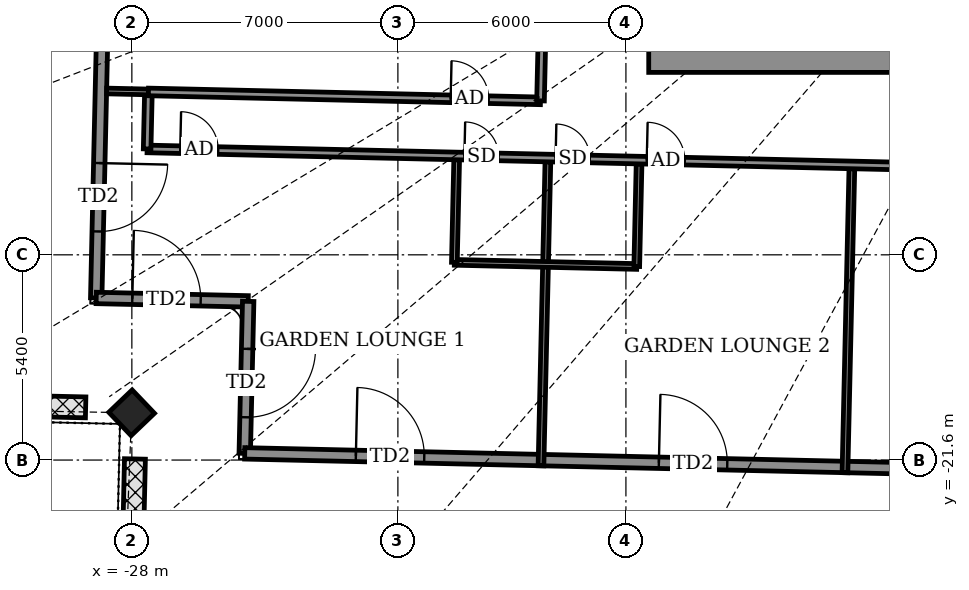
"""IFC4 building model, lengths in metres.
Left out: names, types, materials, properties, quantities, classifications, styles, units other than length and angle.
Written with IfcOpenShell. Run it as: python <this file> out.ifc"""

import sys

from ifc_helpers import new_model, si_unit, direction, frame, frame_2d, origin, origin_2d, place, context, subcontext, project, spatial, rectangle, extrude, element, fill, save


model = new_model("IFC4")
c1 = context("Model", 3, precision=1e-05, world=origin(), true_north=direction((0.0, 1.0)))
c2 = subcontext(c1, "Body", "Model", "MODEL_VIEW")
j1 = project(units=[si_unit("LENGTHUNIT", "METRE"), si_unit("PLANEANGLEUNIT", "RADIAN")], contexts=[c1])
p1 = place(None, origin())
s1 = spatial("IfcSite", under=j1, at=p1, CompositionType="ELEMENT")
p2 = place(p1, origin())
s2 = spatial("IfcBuilding", under=s1, at=p2, CompositionType="ELEMENT")
p3 = place(p2, frame((0.0, 0.0, 329.7)))
s3 = spatial("IfcBuildingStorey", under=s2, at=p3, CompositionType="ELEMENT", Elevation=329.7)
p4 = place(p3, frame((-28.006, -20.356, -0.55), z_axis=(0.0, 0.0, 1.0), x_axis=(0.690863130287, -0.722985570541, 0.0)))
e1 = element("IfcColumn", 1, at=p4, inside=s3, PredefinedType="COLUMN", context=c2, shape_type="SweptSolid", body=[
    extrude(rectangle(XDim=0.85, YDim=0.85, at=origin_2d()), origin(), (0.0, 0.0, 1.0), 4.6),
])
p5 = place(p3, frame((-28.648, -4.559, 0.0), z_axis=(0.0, 0.0, 1.0), x_axis=(-0.022696235044, -0.99974240728, 0.0)))
e2 = element("IfcWall", 2, at=p5, inside=s3, PredefinedType="SOLIDWALL", context=c2, shape_type="SweptSolid", body=[
    extrude(rectangle(XDim=12.779, YDim=0.3, at=frame_2d((6.39, 0.0))), origin(), (0.0, 0.0, 1.0), 2.1),
])
p6 = place(p5, frame((2.792, 0.0, 0.0)))
e3 = element("IfcOpeningElement", 3, at=p6, cuts=e2, PredefinedType="OPENING", context=c2, shape_type="SweptSolid", body=[
    extrude(rectangle(XDim=1.8, YDim=2.0, at=frame_2d((0.9, 1.0))), frame((0.0, 0.16, 0.0), z_axis=(0.0, -1.0, 0.0), x_axis=(1.0, 0.0, 0.0)), (0.0, 0.0, 1.0), 0.32),
])
p7 = place(p5, frame((9.229, 0.0, 0.0)))
e4 = element("IfcOpeningElement", 4, at=p7, cuts=e2, PredefinedType="OPENING", context=c2, shape_type="SweptSolid", body=[
    extrude(rectangle(XDim=1.8, YDim=2.0, at=frame_2d((0.9, 1.0))), frame((0.0, 0.16, 0.0), z_axis=(0.0, -1.0, 0.0), x_axis=(1.0, 0.0, 0.0)), (0.0, 0.0, 1.0), 0.32),
])
p8 = place(p3, frame((-28.938, -17.335, 0.0), z_axis=(0.0, 0.0, 1.0), x_axis=(0.999746353029, -0.022521758502, 0.0)))
e5 = element("IfcWall", 5, at=p8, inside=s3, PredefinedType="SOLIDWALL", context=c2, shape_type="SweptSolid", body=[
    extrude(rectangle(XDim=4.0, YDim=0.3, at=frame_2d((2.0, 0.0))), origin(), (0.0, 0.0, 1.0), 2.1),
])
p9 = place(p8, frame((0.95, 0.0, 0.0)))
e6 = element("IfcOpeningElement", 6, at=p9, cuts=e5, PredefinedType="OPENING", context=c2, shape_type="SweptSolid", body=[
    extrude(rectangle(XDim=1.8, YDim=2.0, at=frame_2d((0.9, 1.0))), frame((0.0, 0.16, 0.0), z_axis=(0.0, -1.0, 0.0), x_axis=(1.0, 0.0, 0.0)), (0.0, 0.0, 1.0), 0.32),
])
p10 = place(p3, frame((-24.939, -17.425, 0.0), z_axis=(0.0, 0.0, 1.0), x_axis=(-0.022765770952, -0.999740826251, 0.0)))
e7 = element("IfcWall", 7, at=p10, inside=s3, PredefinedType="SOLIDWALL", context=c2, shape_type="SweptSolid", body=[
    extrude(rectangle(XDim=4.0, YDim=0.3, at=frame_2d((2.0, 0.0))), origin(), (0.0, 0.0, 1.0), 2.15),
])
p11 = place(p10, frame((1.25, 0.0, 0.0)))
e8 = element("IfcOpeningElement", 8, at=p11, cuts=e7, PredefinedType="OPENING", context=c2, shape_type="SweptSolid", body=[
    extrude(rectangle(XDim=1.8, YDim=2.0, at=frame_2d((0.9, 1.0))), frame((0.0, 0.16, 0.0), z_axis=(0.0, -1.0, 0.0), x_axis=(1.0, 0.0, 0.0)), (0.0, 0.0, 1.0), 0.32),
])
p12 = place(p3, frame((-25.03, -21.424, 0.0), z_axis=(0.0, 0.0, 1.0), x_axis=(0.9997425899, -0.022688189451, 0.0)))
e9 = element("IfcWall", 9, at=p12, inside=s3, PredefinedType="SOLIDWALL", context=c2, shape_type="SweptSolid", body=[
    extrude(rectangle(XDim=47.25, YDim=0.3, at=frame_2d((23.625, 0.0))), origin(), (0.0, 0.0, 1.0), 2.15),
])
p13 = place(p12, frame((2.925, 0.0, 0.0)))
e10 = element("IfcOpeningElement", 10, at=p13, cuts=e9, PredefinedType="OPENING", context=c2, shape_type="SweptSolid", body=[
    extrude(rectangle(XDim=1.8, YDim=2.0, at=frame_2d((0.9, 1.0))), frame((0.0, 0.16, 0.0), z_axis=(0.0, -1.0, 0.0), x_axis=(1.0, 0.0, 0.0)), (0.0, 0.0, 1.0), 0.32),
])
p14 = place(p12, frame((10.9, 0.0, 0.0)))
e11 = element("IfcOpeningElement", 11, at=p14, cuts=e9, PredefinedType="OPENING", context=c2, shape_type="SweptSolid", body=[
    extrude(rectangle(XDim=1.8, YDim=2.0, at=frame_2d((0.9, 1.0))), frame((0.0, 0.16, 0.0), z_axis=(0.0, -1.0, 0.0), x_axis=(1.0, 0.0, 0.0)), (0.0, 0.0, 1.0), 0.32),
])
p15 = place(p12, frame((18.475, 0.0, 0.0)))
e12 = element("IfcOpeningElement", 12, at=p15, cuts=e9, PredefinedType="OPENING", context=c2, shape_type="SweptSolid", body=[
    extrude(rectangle(XDim=1.8, YDim=2.0, at=frame_2d((0.9, 1.0))), frame((0.0, 0.16, 0.0), z_axis=(0.0, -1.0, 0.0), x_axis=(1.0, 0.0, 0.0)), (0.0, 0.0, 1.0), 0.32),
])
p16 = place(p12, frame((25.625, 0.0, 0.0)))
e13 = element("IfcOpeningElement", 13, at=p16, cuts=e9, PredefinedType="OPENING", context=c2, shape_type="SweptSolid", body=[
    extrude(rectangle(XDim=1.8, YDim=2.0, at=frame_2d((0.9, 1.0))), frame((0.0, 0.16, 0.0), z_axis=(0.0, -1.0, 0.0), x_axis=(1.0, 0.0, 0.0)), (0.0, 0.0, 1.0), 0.32),
])
p17 = place(p12, frame((31.525, 0.0, 0.0)))
e14 = element("IfcOpeningElement", 14, at=p17, cuts=e9, PredefinedType="OPENING", context=c2, shape_type="SweptSolid", body=[
    extrude(rectangle(XDim=1.8, YDim=2.0, at=frame_2d((0.9, 1.0))), frame((0.0, 0.16, 0.0), z_axis=(0.0, -1.0, 0.0), x_axis=(1.0, 0.0, 0.0)), (0.0, 0.0, 1.0), 0.32),
])
p18 = place(p12, frame((36.2, 0.0, 0.0)))
e15 = element("IfcOpeningElement", 15, at=p18, cuts=e9, PredefinedType="OPENING", context=c2, shape_type="SweptSolid", body=[
    extrude(rectangle(XDim=1.8, YDim=2.0, at=frame_2d((0.9, 1.0))), frame((0.0, 0.16, 0.0), z_axis=(0.0, -1.0, 0.0), x_axis=(1.0, 0.0, 0.0)), (0.0, 0.0, 1.0), 0.32),
])
p19 = place(p12, frame((42.525, 0.0, 0.0)))
e16 = element("IfcOpeningElement", 16, at=p19, cuts=e9, PredefinedType="OPENING", context=c2, shape_type="SweptSolid", body=[
    extrude(rectangle(XDim=1.8, YDim=2.0, at=frame_2d((0.9, 1.0))), frame((0.0, 0.16, 0.0), z_axis=(0.0, -1.0, 0.0), x_axis=(1.0, 0.0, 0.0)), (0.0, 0.0, 1.0), 0.32),
])
p20 = place(p3, frame((-27.967, -23.708, 0.0), z_axis=(0.0, 0.0, 1.0), x_axis=(0.022500871039, 0.999746823352, 0.0)))
e17 = element("IfcWall", 17, at=p20, inside=s3, PredefinedType="USERDEFINED", context=c2, shape_type="SweptSolid", body=[
    extrude(rectangle(XDim=2.137, YDim=0.55, at=frame_2d((1.069, 0.0))), origin(), (0.0, 0.0, 1.0), 0.8),
])
p21 = place(p3, frame((-29.216, -20.214, 0.0), z_axis=(0.0, 0.0, 1.0), x_axis=(-0.999746591885, 0.022511153115, 0.0)))
e18 = element("IfcWall", 18, at=p21, inside=s3, PredefinedType="USERDEFINED", context=c2, shape_type="SweptSolid", body=[
    extrude(rectangle(XDim=2.136, YDim=0.55, at=frame_2d((1.068, 0.0))), origin(), (0.0, 0.0, 1.0), 0.8),
])
p22 = place(p3, frame((-17.235, -21.751, 0.0), z_axis=(0.0, 0.0, 1.0), x_axis=(0.022765770952, 0.999740826251, 0.0)))
e19 = element("IfcWall", 19, at=p22, inside=s3, PredefinedType="PARTITIONING", context=c2, shape_type="SweptSolid", body=[
    extrude(rectangle(XDim=8.0, YDim=0.15, at=frame_2d((4.0, 0.0))), origin(), (0.0, 0.0, 1.0), 2.15),
])
p23 = place(p3, frame((-9.237, -21.933, 0.0), z_axis=(0.0, 0.0, 1.0), x_axis=(0.022765770952, 0.999740826251, 0.0)))
e20 = element("IfcWall", 20, at=p23, inside=s3, PredefinedType="PARTITIONING", context=c2, shape_type="SweptSolid", body=[
    extrude(rectangle(XDim=8.0, YDim=0.15, at=frame_2d((4.0, 0.0))), origin(), (0.0, 0.0, 1.0), 2.45),
])
p24 = place(p3, frame((-19.514, -16.398, 0.0), z_axis=(0.0, 0.0, 1.0), x_axis=(0.999741520352, -0.022735269617, 0.0)))
e21 = element("IfcWall", 21, at=p24, inside=s3, PredefinedType="PARTITIONING", context=c2, shape_type="SweptSolid", body=[
    extrude(rectangle(XDim=4.8, YDim=0.15, at=frame_2d((2.4, 0.0))), origin(), (0.0, 0.0, 1.0), 2.15),
])
p25 = place(p3, frame((-19.514, -16.398, 0.0), z_axis=(0.0, 0.0, 1.0), x_axis=(0.02260842146, 0.999744396973, 0.0)))
e22 = element("IfcWall", 22, at=p25, inside=s3, PredefinedType="PARTITIONING", context=c2, shape_type="SweptSolid", body=[
    extrude(rectangle(XDim=2.7, YDim=0.15, at=frame_2d((1.35, 0.0))), origin(), (0.0, 0.0, 1.0), 2.15),
])
p26 = place(p3, frame((-14.715, -16.507, 0.0), z_axis=(0.0, 0.0, 1.0), x_axis=(0.02260842146, 0.999744396973, 0.0)))
e23 = element("IfcWall", 23, at=p26, inside=s3, PredefinedType="PARTITIONING", context=c2, shape_type="SweptSolid", body=[
    extrude(rectangle(XDim=2.7, YDim=0.15, at=frame_2d((1.35, 0.0))), origin(), (0.0, 0.0, 1.0), 2.25),
])
p27 = place(p3, frame((-27.598, -13.414, 0.0), z_axis=(0.0, 0.0, 1.0), x_axis=(0.999742489831, -0.022692598482, 0.0)))
e24 = element("IfcWall", 24, at=p27, inside=s3, PredefinedType="PARTITIONING", context=c2, shape_type="SweptSolid", body=[
    extrude(rectangle(XDim=52.75, YDim=0.2, at=frame_2d((26.375, 0.0))), origin(), (0.0, 0.0, 1.0), 2.1),
])
p28 = place(p27, frame((0.871, 0.0, 0.0)))
e25 = element("IfcOpeningElement", 25, at=p28, cuts=e24, PredefinedType="OPENING", context=c2, shape_type="SweptSolid", body=[
    extrude(rectangle(XDim=1.0, YDim=2.1, at=frame_2d((0.5, 1.05))), frame((0.0, 0.11, 0.0), z_axis=(0.0, -1.0, 0.0), x_axis=(1.0, 0.0, 0.0)), (0.0, 0.0, 1.0), 0.22),
])
p29 = place(p27, frame((8.35, 0.0, 0.0)))
e26 = element("IfcOpeningElement", 26, at=p29, cuts=e24, PredefinedType="OPENING", context=c2, shape_type="SweptSolid", body=[
    extrude(rectangle(XDim=0.9, YDim=2.1, at=frame_2d((0.45, 1.05))), frame((0.0, 0.11, 0.0), z_axis=(0.0, -1.0, 0.0), x_axis=(1.0, 0.0, 0.0)), (0.0, 0.0, 1.0), 0.22),
])
p30 = place(p27, frame((13.15, 0.0, 0.0)))
e27 = element("IfcOpeningElement", 27, at=p30, cuts=e24, PredefinedType="OPENING", context=c2, shape_type="SweptSolid", body=[
    extrude(rectangle(XDim=1.0, YDim=2.1, at=frame_2d((0.5, 1.05))), frame((0.0, 0.11, 0.0), z_axis=(0.0, -1.0, 0.0), x_axis=(1.0, 0.0, 0.0)), (0.0, 0.0, 1.0), 0.22),
])
p31 = place(p27, frame((10.75, 0.0, 0.0)))
e28 = element("IfcOpeningElement", 28, at=p31, cuts=e24, PredefinedType="OPENING", context=c2, shape_type="SweptSolid", body=[
    extrude(rectangle(XDim=0.9, YDim=2.1, at=frame_2d((0.45, 1.05))), frame((0.0, 0.11, 0.0), z_axis=(0.0, -1.0, 0.0), x_axis=(1.0, 0.0, 0.0)), (0.0, 0.0, 1.0), 0.22),
])
p32 = place(p27, frame((19.625, 0.0, 0.0)))
e29 = element("IfcOpeningElement", 29, at=p32, cuts=e24, PredefinedType="OPENING", context=c2, shape_type="SweptSolid", body=[
    extrude(rectangle(XDim=1.0, YDim=2.1, at=frame_2d((0.5, 1.05))), frame((0.0, 0.11, 0.0), z_axis=(0.0, -1.0, 0.0), x_axis=(1.0, 0.0, 0.0)), (0.0, 0.0, 1.0), 0.22),
])
p33 = place(p27, frame((26.874, 0.0, 0.0)))
e30 = element("IfcOpeningElement", 30, at=p33, cuts=e24, PredefinedType="OPENING", context=c2, shape_type="SweptSolid", body=[
    extrude(rectangle(XDim=1.0, YDim=2.1, at=frame_2d((0.5, 1.05))), frame((0.0, 0.11, 0.0), z_axis=(0.0, -1.0, 0.0), x_axis=(1.0, 0.0, 0.0)), (0.0, 0.0, 1.0), 0.22),
])
p34 = place(p27, frame((33.05, 0.0, 0.0)))
e31 = element("IfcOpeningElement", 31, at=p34, cuts=e24, PredefinedType="OPENING", context=c2, shape_type="SweptSolid", body=[
    extrude(rectangle(XDim=1.0, YDim=2.1, at=frame_2d((0.5, 1.05))), frame((0.0, 0.11, 0.0), z_axis=(0.0, -1.0, 0.0), x_axis=(1.0, 0.0, 0.0)), (0.0, 0.0, 1.0), 0.22),
])
p35 = place(p27, frame((35.3, 0.0, 0.0)))
e32 = element("IfcOpeningElement", 32, at=p35, cuts=e24, PredefinedType="OPENING", context=c2, shape_type="SweptSolid", body=[
    extrude(rectangle(XDim=0.9, YDim=2.1, at=frame_2d((0.45, 1.05))), frame((0.0, 0.11, 0.0), z_axis=(0.0, -1.0, 0.0), x_axis=(1.0, 0.0, 0.0)), (0.0, 0.0, 1.0), 0.22),
])
p36 = place(p27, frame((40.1, 0.0, 0.0)))
e33 = element("IfcOpeningElement", 33, at=p36, cuts=e24, PredefinedType="OPENING", context=c2, shape_type="SweptSolid", body=[
    extrude(rectangle(XDim=1.0, YDim=2.1, at=frame_2d((0.5, 1.05))), frame((0.0, 0.11, 0.0), z_axis=(0.0, -1.0, 0.0), x_axis=(1.0, 0.0, 0.0)), (0.0, 0.0, 1.0), 0.22),
])
p37 = place(p27, frame((37.7, 0.0, 0.0)))
e34 = element("IfcOpeningElement", 34, at=p37, cuts=e24, PredefinedType="OPENING", context=c2, shape_type="SweptSolid", body=[
    extrude(rectangle(XDim=0.9, YDim=2.1, at=frame_2d((0.45, 1.05))), frame((0.0, 0.11, 0.0), z_axis=(0.0, -1.0, 0.0), x_axis=(1.0, 0.0, 0.0)), (0.0, 0.0, 1.0), 0.22),
])
p38 = place(p27, frame((46.964, 0.0, 0.0)))
e35 = element("IfcOpeningElement", 35, at=p38, cuts=e24, PredefinedType="OPENING", context=c2, shape_type="SweptSolid", body=[
    extrude(rectangle(XDim=1.0, YDim=2.1, at=frame_2d((0.5, 1.05))), frame((0.0, 0.11, 0.0), z_axis=(0.0, -1.0, 0.0), x_axis=(1.0, 0.0, 0.0)), (0.0, 0.0, 1.0), 0.22),
])
p39 = place(p27, frame((42.4, 0.0, 0.0)))
e36 = element("IfcOpeningElement", 36, at=p39, cuts=e24, PredefinedType="OPENING", context=c2, shape_type="SweptSolid", body=[
    extrude(rectangle(XDim=0.9, YDim=2.1, at=frame_2d((0.45, 1.05))), frame((0.0, 0.11, 0.0), z_axis=(0.0, -1.0, 0.0), x_axis=(1.0, 0.0, 0.0)), (0.0, 0.0, 1.0), 0.22),
])
p40 = place(p3, frame((-27.598, -13.414, 0.0), z_axis=(0.0, 0.0, 1.0), x_axis=(0.022617910375, 0.999744182344, 0.0)))
e37 = element("IfcWall", 37, at=p40, inside=s3, PredefinedType="PARTITIONING", context=c2, shape_type="SweptSolid", body=[
    extrude(rectangle(XDim=1.5, YDim=0.2, at=frame_2d((0.75, 0.0))), origin(), (0.0, 0.0, 1.0), 4.05),
])
p41 = place(p3, frame((-28.664, -11.889, 0.0), z_axis=(0.0, 0.0, 1.0), x_axis=(0.999738848859, -0.022852441507, 0.0)))
e38 = element("IfcWall", 38, at=p41, inside=s3, PredefinedType="PARTITIONING", context=c2, shape_type="SweptSolid", body=[
    extrude(rectangle(XDim=1.1, YDim=0.15, at=frame_2d((0.55, 0.0))), origin(), (0.0, 0.0, 1.0), 2.15),
])
p42 = place(p3, frame((-27.564, -11.914, 0.0), z_axis=(0.0, 0.0, 1.0), x_axis=(0.999740930851, -0.02276117706, 0.0)))
e39 = element("IfcWall", 39, at=p42, inside=s3, PredefinedType="PARTITIONING", context=c2, shape_type="SweptSolid", body=[
    extrude(rectangle(XDim=10.319, YDim=0.2, at=frame_2d((5.159, 0.0))), origin(), (0.0, 0.0, 1.0), 2.1),
])
p43 = place(p42, frame((7.955, 0.0, 0.0)))
e40 = element("IfcOpeningElement", 40, at=p43, cuts=e39, PredefinedType="OPENING", context=c2, shape_type="SweptSolid", body=[
    extrude(rectangle(XDim=1.0, YDim=2.1, at=frame_2d((0.5, 1.05))), frame((0.0, 0.11, 0.0), z_axis=(0.0, -1.0, 0.0), x_axis=(1.0, 0.0, 0.0)), (0.0, 0.0, 1.0), 0.22),
])
p44 = place(p3, frame((-17.247, -12.149, 0.0), z_axis=(0.0, 0.0, 1.0), x_axis=(0.022696191528, 0.999742408268, 0.0)))
e41 = element("IfcWall", 41, at=p44, inside=s3, PredefinedType="PARTITIONING", context=c2, shape_type="SweptSolid", body=[
    extrude(rectangle(XDim=25.074, YDim=0.2, at=frame_2d((12.537, 0.0))), origin(), (0.0, 0.0, 1.0), 2.1),
])
p45 = place(p44, frame((17.425, 0.0, 0.0)))
e42 = element("IfcOpeningElement", 42, at=p45, cuts=e41, PredefinedType="OPENING", context=c2, shape_type="SweptSolid", body=[
    extrude(rectangle(XDim=1.0, YDim=2.1, at=frame_2d((0.5, 1.05))), frame((0.0, 0.11, 0.0), z_axis=(0.0, -1.0, 0.0), x_axis=(1.0, 0.0, 0.0)), (0.0, 0.0, 1.0), 0.22),
])
p46 = place(p44, frame((19.925, 0.0, 0.0)))
e43 = element("IfcOpeningElement", 43, at=p46, cuts=e41, PredefinedType="OPENING", context=c2, shape_type="SweptSolid", body=[
    extrude(rectangle(XDim=0.9, YDim=2.1, at=frame_2d((0.45, 1.05))), frame((0.0, 0.11, 0.0), z_axis=(0.0, -1.0, 0.0), x_axis=(1.0, 0.0, 0.0)), (0.0, 0.0, 1.0), 0.22),
])
p47 = place(p44, frame((13.973, 0.0, 0.0)))
e44 = element("IfcOpeningElement", 44, at=p47, cuts=e41, PredefinedType="OPENING", context=c2, shape_type="SweptSolid", body=[
    extrude(rectangle(XDim=1.0, YDim=2.1, at=frame_2d((0.5, 1.05))), frame((0.0, 0.11, 0.0), z_axis=(0.0, -1.0, 0.0), x_axis=(1.0, 0.0, 0.0)), (0.0, 0.0, 1.0), 0.22),
])
p48 = place(p44, frame((8.575, 0.0, 0.0)))
e45 = element("IfcOpeningElement", 45, at=p48, cuts=e41, PredefinedType="OPENING", context=c2, shape_type="SweptSolid", body=[
    extrude(rectangle(XDim=0.9, YDim=2.1, at=frame_2d((0.45, 1.05))), frame((0.0, 0.11, 0.0), z_axis=(0.0, -1.0, 0.0), x_axis=(1.0, 0.0, 0.0)), (0.0, 0.0, 1.0), 0.22),
])
p49 = place(p44, frame((6.175, 0.0, 0.0)))
e46 = element("IfcOpeningElement", 46, at=p49, cuts=e41, PredefinedType="OPENING", context=c2, shape_type="SweptSolid", body=[
    extrude(rectangle(XDim=0.9, YDim=2.1, at=frame_2d((0.45, 1.05))), frame((0.0, 0.11, 0.0), z_axis=(0.0, -1.0, 0.0), x_axis=(1.0, 0.0, 0.0)), (0.0, 0.0, 1.0), 0.22),
])
p50 = place(p3, frame((-14.4, -11.1, 0.0), z_axis=(0.0, 0.0, 1.0), x_axis=(1.0, 0.0, 0.0)))
e47 = element("IfcWall", 47, at=p50, inside=s3, PredefinedType="SHEAR", context=c2, shape_type="SweptSolid", body=[
    extrude(rectangle(XDim=28.8, YDim=0.6, at=frame_2d((14.4, 0.0))), origin(), (0.0, 0.0, 1.0), 4.6),
])
p51 = place(p7, origin())
e48 = element("IfcDoor", 48, at=p51, inside=s3, OperationType="DOUBLE_DOOR_SINGLE_SWING", PredefinedType="DOOR", context=c2, shape_type="SweptSolid", body=[
    extrude(rectangle(XDim=1.8, YDim=2.0, at=frame_2d((0.9, 1.0))), frame((0.0, 0.025, 0.0), z_axis=(0.0, -1.0, 0.0), x_axis=(1.0, 0.0, 0.0)), (0.0, 0.0, 1.0), 0.05),
])
fill(e4, e48)
p52 = place(p9, origin())
e49 = element("IfcDoor", 49, at=p52, inside=s3, OperationType="DOUBLE_DOOR_SINGLE_SWING", PredefinedType="DOOR", context=c2, shape_type="SweptSolid", body=[
    extrude(rectangle(XDim=1.8, YDim=2.0, at=frame_2d((0.9, 1.0))), frame((0.0, 0.025, 0.0), z_axis=(0.0, -1.0, 0.0), x_axis=(1.0, 0.0, 0.0)), (0.0, 0.0, 1.0), 0.05),
])
fill(e6, e49)
p53 = place(p11, origin())
e50 = element("IfcDoor", 50, at=p53, inside=s3, OperationType="DOUBLE_DOOR_SINGLE_SWING", PredefinedType="DOOR", context=c2, shape_type="SweptSolid", body=[
    extrude(rectangle(XDim=1.8, YDim=2.0, at=frame_2d((0.9, 1.0))), frame((0.0, 0.025, 0.0), z_axis=(0.0, -1.0, 0.0), x_axis=(1.0, 0.0, 0.0)), (0.0, 0.0, 1.0), 0.05),
])
fill(e8, e50)
p54 = place(p13, origin())
e51 = element("IfcDoor", 51, at=p54, inside=s3, OperationType="DOUBLE_DOOR_SINGLE_SWING", PredefinedType="DOOR", context=c2, shape_type="SweptSolid", body=[
    extrude(rectangle(XDim=1.8, YDim=2.0, at=frame_2d((0.9, 1.0))), frame((0.0, 0.025, 0.0), z_axis=(0.0, -1.0, 0.0), x_axis=(1.0, 0.0, 0.0)), (0.0, 0.0, 1.0), 0.05),
])
fill(e10, e51)
p55 = place(p14, origin())
e52 = element("IfcDoor", 52, at=p55, inside=s3, OperationType="DOUBLE_DOOR_SINGLE_SWING", PredefinedType="DOOR", context=c2, shape_type="SweptSolid", body=[
    extrude(rectangle(XDim=1.8, YDim=2.0, at=frame_2d((0.9, 1.0))), frame((0.0, 0.025, 0.0), z_axis=(0.0, -1.0, 0.0), x_axis=(1.0, 0.0, 0.0)), (0.0, 0.0, 1.0), 0.05),
])
fill(e11, e52)
p56 = place(p28, origin())
e53 = element("IfcDoor", 53, at=p56, inside=s3, OperationType="SINGLE_SWING_LEFT", PredefinedType="DOOR", context=c2, shape_type="SweptSolid", body=[
    extrude(rectangle(XDim=1.0, YDim=2.1, at=frame_2d((0.5, 1.05))), frame((0.0, 0.025, 0.0), z_axis=(0.0, -1.0, 0.0), x_axis=(1.0, 0.0, 0.0)), (0.0, 0.0, 1.0), 0.05),
])
fill(e25, e53)
p57 = place(p29, origin())
e54 = element("IfcDoor", 54, at=p57, inside=s3, OperationType="SINGLE_SWING_LEFT", PredefinedType="DOOR", context=c2, shape_type="SweptSolid", body=[
    extrude(rectangle(XDim=0.9, YDim=2.1, at=frame_2d((0.45, 1.05))), frame((0.0, 0.025, 0.0), z_axis=(0.0, -1.0, 0.0), x_axis=(1.0, 0.0, 0.0)), (0.0, 0.0, 1.0), 0.05),
])
fill(e26, e54)
p58 = place(p30, origin())
e55 = element("IfcDoor", 55, at=p58, inside=s3, OperationType="SINGLE_SWING_RIGHT", PredefinedType="DOOR", context=c2, shape_type="SweptSolid", body=[
    extrude(rectangle(XDim=1.0, YDim=2.1, at=frame_2d((0.5, 1.05))), frame((0.0, 0.025, 0.0), z_axis=(0.0, -1.0, 0.0), x_axis=(1.0, 0.0, 0.0)), (0.0, 0.0, 1.0), 0.05),
])
fill(e27, e55)
p59 = place(p31, origin())
e56 = element("IfcDoor", 56, at=p59, inside=s3, OperationType="SINGLE_SWING_RIGHT", PredefinedType="DOOR", context=c2, shape_type="SweptSolid", body=[
    extrude(rectangle(XDim=0.9, YDim=2.1, at=frame_2d((0.45, 1.05))), frame((0.0, 0.025, 0.0), z_axis=(0.0, -1.0, 0.0), x_axis=(1.0, 0.0, 0.0)), (0.0, 0.0, 1.0), 0.05),
])
fill(e28, e56)
p60 = place(p43, origin())
e57 = element("IfcDoor", 57, at=p60, inside=s3, OperationType="SINGLE_SWING_RIGHT", PredefinedType="DOOR", context=c2, shape_type="SweptSolid", body=[
    extrude(rectangle(XDim=1.0, YDim=2.1, at=frame_2d((0.5, 1.05))), frame((0.0, 0.025, 0.0), z_axis=(0.0, -1.0, 0.0), x_axis=(1.0, 0.0, 0.0)), (0.0, 0.0, 1.0), 0.05),
])
fill(e40, e57)
save(model, sys.argv[1])
